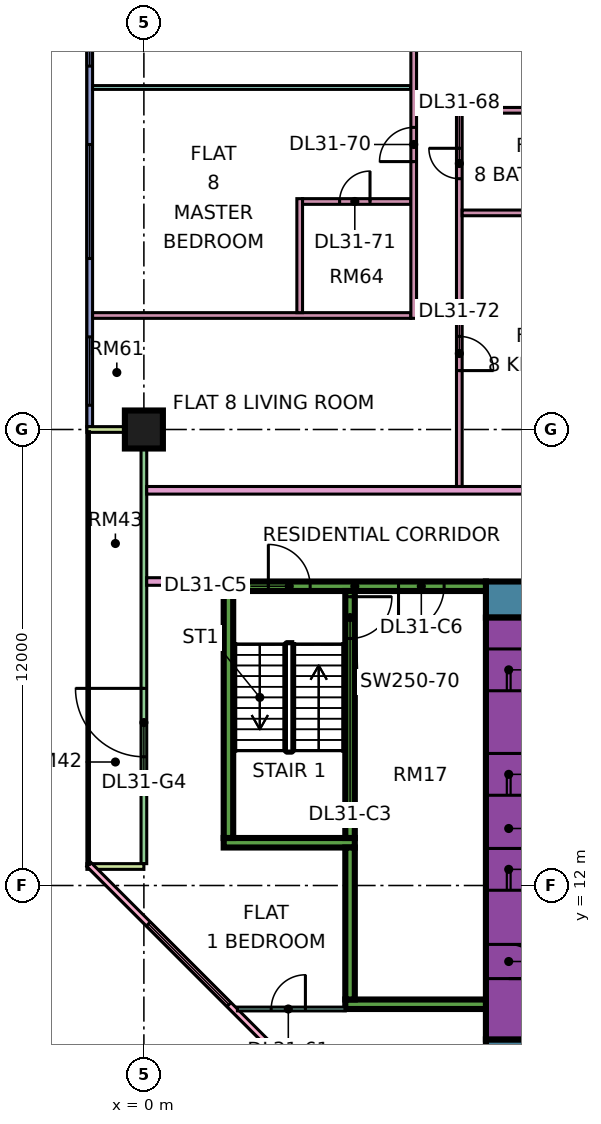
"""IFC4 building model, lengths in metres.
Left out: names, types, materials, properties, quantities, classifications, styles, units other than length and angle.
Written with IfcOpenShell. Run it as: python <this file> out.ifc"""

import sys

from ifc_helpers import new_model, si_unit, direction, frame, frame_2d, origin, origin_2d, place, context, subcontext, project, spatial, rectangle, extrude, element, fill, save


model = new_model("IFC4")
c1 = context("Model", 3, precision=1e-05, world=origin(), true_north=direction((0.0, 1.0)))
c2 = subcontext(c1, "Body", "Model", "MODEL_VIEW")
j1 = project(units=[si_unit("LENGTHUNIT", "METRE"), si_unit("PLANEANGLEUNIT", "RADIAN")], contexts=[c1])
p1 = place(None, origin())
s1 = spatial("IfcSite", under=j1, at=p1, CompositionType="ELEMENT")
p2 = place(p1, origin())
s2 = spatial("IfcBuilding", under=s1, at=p2, CompositionType="ELEMENT")
p3 = place(p2, frame((0.0, 0.0, 133.15)))
s3 = spatial("IfcBuildingStorey", under=s2, at=p3, CompositionType="ELEMENT", Elevation=133.15)
p4 = place(p3, frame((0.0, 24.0, 0.0), z_axis=(0.0, 0.0, 1.0), x_axis=(1.0, 0.0, 0.0)))
e1 = element("IfcColumn", 1, at=p4, inside=s3, PredefinedType="COLUMN", context=c2, shape_type="SweptSolid", body=[
    extrude(rectangle(XDim=1.0, YDim=1.0, at=origin_2d()), origin(), (0.0, 0.0, 1.0), 3.75),
])
p5 = place(p3, frame((9.0, 7.475, 0.0), z_axis=(0.0, 0.0, 1.0), x_axis=(1.0, 0.0, 0.0)))
e2 = element("IfcWall", 2, at=p5, inside=s3, PredefinedType="SHEAR", context=c2, shape_type="SweptSolid", body=[
    extrude(rectangle(XDim=25.0, YDim=0.95, at=frame_2d((12.5, 0.0))), origin(), (0.0, 0.0, 1.0), 3.75),
])
p6 = place(p3, frame((9.0, 19.525, 0.0), z_axis=(0.0, 0.0, 1.0), x_axis=(1.0, 0.0, 0.0)))
e3 = element("IfcWall", 3, at=p6, inside=s3, PredefinedType="SHEAR", context=c2, shape_type="SweptSolid", body=[
    extrude(rectangle(XDim=25.0, YDim=0.95, at=frame_2d((12.5, 0.0))), origin(), (0.0, 0.0, 1.0), 3.75),
])
p7 = place(p6, frame((19.1, 0.0, 0.0)))
e4 = element("IfcOpeningElement", 4, at=p7, cuts=e3, PredefinedType="OPENING", context=c2, shape_type="SweptSolid", body=[
    extrude(rectangle(XDim=1.8, YDim=2.4, at=frame_2d((0.9, 1.2))), frame((0.0, 0.485, 0.0), z_axis=(0.0, -1.0, 0.0), x_axis=(1.0, 0.0, 0.0)), (0.0, 0.0, 1.0), 0.97),
])
p8 = place(p3, frame((9.6, 7.95, 0.0), z_axis=(0.0, 0.0, 1.0), x_axis=(0.0, 1.0, 0.0)))
e5 = element("IfcWall", 5, at=p8, inside=s3, PredefinedType="SHEAR", context=c2, shape_type="SweptSolid", body=[
    extrude(rectangle(XDim=11.1, YDim=1.2, at=frame_2d((5.55, 0.0))), origin(), (0.0, 0.0, 1.0), 3.75),
])
p9 = place(p8, frame((3.925, 0.0, 0.0)))
e6 = element("IfcOpeningElement", 6, at=p9, cuts=e5, PredefinedType="OPENING", context=c2, shape_type="SweptSolid", body=[
    extrude(rectangle(XDim=1.1, YDim=2.2, at=frame_2d((0.55, 1.1))), frame((0.0, 0.61, 0.0), z_axis=(0.0, -1.0, 0.0), x_axis=(1.0, 0.0, 0.0)), (0.0, 0.0, 1.0), 1.22),
])
p10 = place(p8, frame((6.425, 0.0, 0.0)))
e7 = element("IfcOpeningElement", 7, at=p10, cuts=e5, PredefinedType="OPENING", context=c2, shape_type="SweptSolid", body=[
    extrude(rectangle(XDim=1.1, YDim=2.2, at=frame_2d((0.55, 1.1))), frame((0.0, 0.61, 0.0), z_axis=(0.0, -1.0, 0.0), x_axis=(1.0, 0.0, 0.0)), (0.0, 0.0, 1.0), 1.22),
])
p11 = place(p8, frame((9.175, 0.0, 0.0)))
e8 = element("IfcOpeningElement", 8, at=p11, cuts=e5, PredefinedType="OPENING", context=c2, shape_type="SweptSolid", body=[
    extrude(rectangle(XDim=1.1, YDim=2.2, at=frame_2d((0.55, 1.1))), frame((0.0, 0.61, 0.0), z_axis=(0.0, -1.0, 0.0), x_axis=(1.0, 0.0, 0.0)), (0.0, 0.0, 1.0), 1.22),
])
p12 = place(p8, frame((1.6, 0.0, 0.0)))
e9 = element("IfcOpeningElement", 9, at=p12, cuts=e5, PredefinedType="OPENING", context=c2, shape_type="SweptSolid", body=[
    extrude(rectangle(XDim=0.9, YDim=2.1, at=frame_2d((0.45, 1.05))), frame((0.0, 0.61, 0.0), z_axis=(0.0, -1.0, 0.0), x_axis=(1.0, 0.0, 0.0)), (0.0, 0.0, 1.0), 1.22),
])
p13 = place(p3, frame((2.1, 19.875, 0.0), z_axis=(0.0, 0.0, 1.0), x_axis=(1.0, 0.0, 0.0)))
e10 = element("IfcWall", 10, at=p13, inside=s3, PredefinedType="SHEAR", context=c2, shape_type="SweptSolid", body=[
    extrude(rectangle(XDim=6.9, YDim=0.25, at=frame_2d((3.45, 0.0))), origin(), (0.0, 0.0, 1.0), 3.75),
])
p14 = place(p13, frame((1.175, 0.0, 0.0)))
e11 = element("IfcOpeningElement", 11, at=p14, cuts=e10, PredefinedType="OPENING", context=c2, shape_type="SweptSolid", body=[
    extrude(rectangle(XDim=1.1, YDim=2.2, at=frame_2d((0.55, 1.1))), frame((0.0, 0.135, 0.0), z_axis=(0.0, -1.0, 0.0), x_axis=(1.0, 0.0, 0.0)), (0.0, 0.0, 1.0), 0.27),
])
p15 = place(p13, frame((4.6, 0.0, 0.0)))
e12 = element("IfcOpeningElement", 12, at=p15, cuts=e10, PredefinedType="OPENING", context=c2, shape_type="SweptSolid", body=[
    extrude(rectangle(XDim=1.2, YDim=2.2, at=frame_2d((0.6, 1.1))), frame((0.0, 0.135, 0.0), z_axis=(0.0, -1.0, 0.0), x_axis=(1.0, 0.0, 0.0)), (0.0, 0.0, 1.0), 0.27),
])
p16 = place(p3, frame((2.1, 13.125, 0.0), z_axis=(0.0, 0.0, 1.0), x_axis=(1.0, 0.0, 0.0)))
e13 = element("IfcWall", 13, at=p16, inside=s3, PredefinedType="SHEAR", context=c2, shape_type="SweptSolid", body=[
    extrude(rectangle(XDim=3.45, YDim=0.25, at=frame_2d((1.725, 0.0))), origin(), (0.0, 0.0, 1.0), 3.75),
])
p17 = place(p3, frame((2.225, 13.25, 0.0), z_axis=(0.0, 0.0, 1.0), x_axis=(0.0, 1.0, 0.0)))
e14 = element("IfcWall", 14, at=p17, inside=s3, PredefinedType="SHEAR", context=c2, shape_type="SweptSolid", body=[
    extrude(rectangle(XDim=6.5, YDim=0.25, at=frame_2d((3.25, 0.0))), origin(), (0.0, 0.0, 1.0), 3.75),
])
p18 = place(p3, frame((5.425, 13.25, 0.0), z_axis=(0.0, 0.0, 1.0), x_axis=(0.0, 1.0, 0.0)))
e15 = element("IfcWall", 15, at=p18, inside=s3, PredefinedType="SHEAR", context=c2, shape_type="SweptSolid", body=[
    extrude(rectangle(XDim=6.5, YDim=0.25, at=frame_2d((3.25, 0.0))), origin(), (0.0, 0.0, 1.0), 3.75),
])
p19 = place(p18, frame((5.25, 0.0, 0.0)))
e16 = element("IfcOpeningElement", 16, at=p19, cuts=e15, PredefinedType="OPENING", context=c2, shape_type="SweptSolid", body=[
    extrude(rectangle(XDim=1.1, YDim=2.2, at=frame_2d((0.55, 1.1))), frame((0.0, 0.135, 0.0), z_axis=(0.0, -1.0, 0.0), x_axis=(1.0, 0.0, 0.0)), (0.0, 0.0, 1.0), 0.27),
])
p20 = place(p3, frame((5.3, 8.875, 0.0), z_axis=(0.0, 0.0, 1.0), x_axis=(1.0, 0.0, 0.0)))
e17 = element("IfcWall", 17, at=p20, inside=s3, PredefinedType="SHEAR", context=c2, shape_type="SweptSolid", body=[
    extrude(rectangle(XDim=3.7, YDim=0.25, at=frame_2d((1.85, 0.0))), origin(), (0.0, 0.0, 1.0), 3.75),
])
p21 = place(p3, frame((5.425, 9.0, 0.0), z_axis=(0.0, 0.0, 1.0), x_axis=(0.0, 1.0, 0.0)))
e18 = element("IfcWall", 18, at=p21, inside=s3, PredefinedType="SHEAR", context=c2, shape_type="SweptSolid", body=[
    extrude(rectangle(XDim=4.0, YDim=0.25, at=frame_2d((2.0, 0.0))), origin(), (0.0, 0.0, 1.0), 3.75),
])
p22 = place(p3, frame((-1.425, 35.925, 0.0), z_axis=(0.0, 0.0, 1.0), x_axis=(0.0, -1.0, 0.0)))
e19 = element("IfcWall", 19, at=p22, inside=s3, PredefinedType="SOLIDWALL", context=c2, shape_type="SweptSolid", body=[
    extrude(rectangle(XDim=11.85, YDim=0.15, at=frame_2d((5.925, 0.0))), origin(), (0.0, 0.0, 1.0), 3.35),
])
p23 = place(p22, frame((0.562, 0.0, 0.45)))
e20 = element("IfcOpeningElement", 20, at=p23, cuts=e19, PredefinedType="OPENING", context=c2, shape_type="SweptSolid", body=[
    extrude(rectangle(XDim=1.8, YDim=2.4, at=frame_2d((0.9, 1.2))), frame((0.0, 0.085, 0.0), z_axis=(0.0, -1.0, 0.0), x_axis=(1.0, 0.0, 0.0)), (0.0, 0.0, 1.0), 0.17),
])
p24 = place(p22, frame((4.425, 0.0, 0.45)))
e21 = element("IfcOpeningElement", 21, at=p24, cuts=e19, PredefinedType="OPENING", context=c2, shape_type="SweptSolid", body=[
    extrude(rectangle(XDim=3.0, YDim=2.4, at=frame_2d((1.5, 1.2))), frame((0.0, 0.085, 0.0), z_axis=(0.0, -1.0, 0.0), x_axis=(1.0, 0.0, 0.0)), (0.0, 0.0, 1.0), 0.17),
])
p25 = place(p22, frame((9.488, 0.0, 0.45)))
e22 = element("IfcOpeningElement", 22, at=p25, cuts=e19, PredefinedType="OPENING", context=c2, shape_type="SweptSolid", body=[
    extrude(rectangle(XDim=1.8, YDim=2.4, at=frame_2d((0.9, 1.2))), frame((0.0, 0.085, 0.0), z_axis=(0.0, -1.0, 0.0), x_axis=(1.0, 0.0, 0.0)), (0.0, 0.0, 1.0), 0.17),
])
p26 = place(p3, frame((0.0, 23.925, 0.0), z_axis=(0.0, 0.0, 1.0), x_axis=(0.0, -1.0, 0.0)))
e23 = element("IfcWall", 23, at=p26, inside=s3, PredefinedType="SOLIDWALL", context=c2, shape_type="SweptSolid", body=[
    extrude(rectangle(XDim=11.35, YDim=0.15, at=frame_2d((5.675, 0.0))), origin(), (0.0, 0.0, 1.0), 3.35),
])
p27 = place(p26, frame((6.738, 0.0, 0.0)))
e24 = element("IfcOpeningElement", 24, at=p27, cuts=e23, PredefinedType="OPENING", context=c2, shape_type="SweptSolid", body=[
    extrude(rectangle(XDim=1.8, YDim=2.4, at=frame_2d((0.9, 1.2))), frame((0.0, 0.085, 0.0), z_axis=(0.0, -1.0, 0.0), x_axis=(1.0, 0.0, 0.0)), (0.0, 0.0, 1.0), 0.17),
])
for number, where, z_axis, x_axis in (
    (25, (-1.5, 24.0, 0.0), (0.0, 0.0, 1.0), (1.0, 0.0, 0.0)),
    (26, (-1.5, 12.5, 0.0), (0.0, 0.0, 1.0), (1.0, 0.0, 0.0)),
):
    element("IfcWall", number, at=place(p3, frame(where, z_axis=z_axis, x_axis=x_axis)), inside=s3, PredefinedType="SOLIDWALL", context=c2, shape_type="SweptSolid", body=[
        extrude(rectangle(XDim=1.5, YDim=0.15, at=frame_2d((0.75, 0.0))), origin(), (0.0, 0.0, 1.0), 3.35),
    ])
p28 = place(p3, frame((-1.447, 12.553, 0.0), z_axis=(0.0, 0.0, 1.0), x_axis=(0.707106781187, -0.707106781187, 0.0)))
e27 = element("IfcWall", 27, at=p28, inside=s3, PredefinedType="SOLIDWALL", context=c2, shape_type="SweptSolid", body=[
    extrude(rectangle(XDim=19.799, YDim=0.15, at=frame_2d((9.899, 0.0))), origin(), (0.0, 0.0, 1.0), 3.35),
])
p29 = place(p28, frame((2.212, 0.0, 0.45)))
e28 = element("IfcOpeningElement", 28, at=p29, cuts=e27, PredefinedType="OPENING", context=c2, shape_type="SweptSolid", body=[
    extrude(rectangle(XDim=3.0, YDim=2.4, at=frame_2d((1.5, 1.2))), frame((0.0, 0.085, 0.0), z_axis=(0.0, -1.0, 0.0), x_axis=(1.0, 0.0, 0.0)), (0.0, 0.0, 1.0), 0.17),
])
p30 = place(p28, frame((10.216, 0.0, 0.45)))
e29 = element("IfcOpeningElement", 29, at=p30, cuts=e27, PredefinedType="OPENING", context=c2, shape_type="SweptSolid", body=[
    extrude(rectangle(XDim=3.0, YDim=2.4, at=frame_2d((1.5, 1.2))), frame((0.0, 0.085, 0.0), z_axis=(0.0, -1.0, 0.0), x_axis=(1.0, 0.0, 0.0)), (0.0, 0.0, 1.0), 0.17),
])
p31 = place(p3, frame((-1.351, 33.0, 0.0), z_axis=(0.0, 0.0, 1.0), x_axis=(1.0, 0.0, 0.0)))
e30 = element("IfcWall", 30, at=p31, inside=s3, PredefinedType="PARTITIONING", context=c2, shape_type="SweptSolid", body=[
    extrude(rectangle(XDim=8.376, YDim=0.1, at=frame_2d((4.188, 0.0))), origin(), (0.0, 0.0, 1.0), 3.35),
])
p32 = place(p3, frame((-1.35, 27.0, 0.0), z_axis=(0.0, 0.0, 1.0), x_axis=(1.0, 0.0, 0.0)))
e31 = element("IfcWall", 31, at=p32, inside=s3, PredefinedType="PARTITIONING", context=c2, shape_type="SweptSolid", body=[
    extrude(rectangle(XDim=8.375, YDim=0.15, at=frame_2d((4.188, 0.0))), origin(), (0.0, 0.0, 1.0), 3.35),
])
p33 = place(p3, frame((0.074, 20.0, 0.0), z_axis=(0.0, 0.0, 1.0), x_axis=(1.0, 0.0, 0.0)))
e32 = element("IfcWall", 32, at=p33, inside=s3, PredefinedType="PARTITIONING", context=c2, shape_type="SweptSolid", body=[
    extrude(rectangle(XDim=2.026, YDim=0.2, at=frame_2d((1.013, 0.0))), origin(), (0.0, 0.0, 1.0), 3.35),
])
p34 = place(p3, frame((0.074, 22.4, 0.0), z_axis=(0.0, 0.0, 1.0), x_axis=(1.0, 0.0, 0.0)))
e33 = element("IfcWall", 33, at=p34, inside=s3, PredefinedType="PARTITIONING", context=c2, shape_type="SweptSolid", body=[
    extrude(rectangle(XDim=12.326, YDim=0.2, at=frame_2d((6.163, 0.0))), origin(), (0.0, 0.0, 1.0), 3.35),
])
p35 = place(p3, frame((2.461, 8.75, 0.0), z_axis=(0.0, 0.0, 1.0), x_axis=(1.0, 0.0, 0.0)))
e34 = element("IfcWall", 34, at=p35, inside=s3, PredefinedType="PARTITIONING", context=c2, shape_type="SweptSolid", body=[
    extrude(rectangle(XDim=2.839, YDim=0.1, at=frame_2d((1.419, 0.0))), origin(), (0.0, 0.0, 1.0), 3.35),
])
p36 = place(p35, frame((0.889, 0.0, 0.0)))
e35 = element("IfcOpeningElement", 35, at=p36, cuts=e34, PredefinedType="OPENING", context=c2, shape_type="SweptSolid", body=[
    extrude(rectangle(XDim=0.9, YDim=2.1, at=frame_2d((0.45, 1.05))), frame((0.0, 0.06, 0.0), z_axis=(0.0, -1.0, 0.0), x_axis=(1.0, 0.0, 0.0)), (0.0, 0.0, 1.0), 0.12),
])
p37 = place(p3, frame((4.1, 27.075, 0.0), z_axis=(0.0, 0.0, 1.0), x_axis=(0.0, 1.0, 0.0)))
e36 = element("IfcWall", 36, at=p37, inside=s3, PredefinedType="PARTITIONING", context=c2, shape_type="SweptSolid", body=[
    extrude(rectangle(XDim=3.0, YDim=0.15, at=frame_2d((1.5, 0.0))), origin(), (0.0, 0.0, 1.0), 3.35),
])
p38 = place(p3, frame((4.175, 30.0, 0.0), z_axis=(0.0, 0.0, 1.0), x_axis=(1.0, 0.0, 0.0)))
e37 = element("IfcWall", 37, at=p38, inside=s3, PredefinedType="PARTITIONING", context=c2, shape_type="SweptSolid", body=[
    extrude(rectangle(XDim=2.85, YDim=0.15, at=frame_2d((1.425, 0.0))), origin(), (0.0, 0.0, 1.0), 3.35),
])
p39 = place(p38, frame((0.975, 0.0, 0.0)))
e38 = element("IfcOpeningElement", 38, at=p39, cuts=e37, PredefinedType="OPENING", context=c2, shape_type="SweptSolid", body=[
    extrude(rectangle(XDim=0.8, YDim=2.1, at=frame_2d((0.4, 1.05))), frame((0.0, 0.085, 0.0), z_axis=(0.0, -1.0, 0.0), x_axis=(1.0, 0.0, 0.0)), (0.0, 0.0, 1.0), 0.17),
])
p40 = place(p3, frame((7.1, 26.925, 0.0), z_axis=(0.0, 0.0, 1.0), x_axis=(0.0, 1.0, 0.0)))
e39 = element("IfcWall", 39, at=p40, inside=s3, PredefinedType="PARTITIONING", context=c2, shape_type="SweptSolid", body=[
    extrude(rectangle(XDim=8.975, YDim=0.15, at=frame_2d((4.487, 0.0))), origin(), (0.0, 0.0, 1.0), 3.35),
])
p41 = place(p40, frame((7.125, 0.0, 0.0)))
e40 = element("IfcOpeningElement", 40, at=p41, cuts=e39, PredefinedType="OPENING", context=c2, shape_type="SweptSolid", body=[
    extrude(rectangle(XDim=0.9, YDim=2.1, at=frame_2d((0.45, 1.05))), frame((0.0, 0.085, 0.0), z_axis=(0.0, -1.0, 0.0), x_axis=(1.0, 0.0, 0.0)), (0.0, 0.0, 1.0), 0.17),
])
p42 = place(p40, frame((4.125, 0.0, 0.0)))
e41 = element("IfcOpeningElement", 41, at=p42, cuts=e39, PredefinedType="OPENING", context=c2, shape_type="SweptSolid", body=[
    extrude(rectangle(XDim=0.9, YDim=2.1, at=frame_2d((0.45, 1.05))), frame((0.0, 0.085, 0.0), z_axis=(0.0, -1.0, 0.0), x_axis=(1.0, 0.0, 0.0)), (0.0, 0.0, 1.0), 0.17),
])
p43 = place(p3, frame((8.3, 22.5, 0.0), z_axis=(0.0, 0.0, 1.0), x_axis=(0.0, 1.0, 0.0)))
e42 = element("IfcWall", 42, at=p43, inside=s3, PredefinedType="PARTITIONING", context=c2, shape_type="SweptSolid", body=[
    extrude(rectangle(XDim=9.975, YDim=0.15, at=frame_2d((4.988, 0.0))), origin(), (0.0, 0.0, 1.0), 3.35),
])
p44 = place(p43, frame((8.1, 0.0, 0.0)))
e43 = element("IfcOpeningElement", 43, at=p44, cuts=e42, PredefinedType="OPENING", context=c2, shape_type="SweptSolid", body=[
    extrude(rectangle(XDim=0.8, YDim=2.1, at=frame_2d((0.4, 1.05))), frame((0.0, 0.085, 0.0), z_axis=(0.0, -1.0, 0.0), x_axis=(1.0, 0.0, 0.0)), (0.0, 0.0, 1.0), 0.17),
])
p45 = place(p43, frame((3.05, 0.0, 0.0)))
e44 = element("IfcOpeningElement", 44, at=p45, cuts=e42, PredefinedType="OPENING", context=c2, shape_type="SweptSolid", body=[
    extrude(rectangle(XDim=0.9, YDim=2.1, at=frame_2d((0.45, 1.05))), frame((0.0, 0.085, 0.0), z_axis=(0.0, -1.0, 0.0), x_axis=(1.0, 0.0, 0.0)), (0.0, 0.0, 1.0), 0.17),
])
for number, where, z_axis, x_axis in (
    (45, (8.375, 29.7, 0.0), (0.0, 0.0, 1.0), (1.0, 0.0, 0.0)),
    (46, (8.375, 32.4, 0.0), (0.0, 0.0, 1.0), (1.0, 0.0, 0.0)),
):
    element("IfcWall", number, at=place(p3, frame(where, z_axis=z_axis, x_axis=x_axis)), inside=s3, PredefinedType="PARTITIONING", context=c2, shape_type="SweptSolid", body=[
        extrude(rectangle(XDim=4.025, YDim=0.15, at=frame_2d((2.012, 0.0))), origin(), (0.0, 0.0, 1.0), 3.35),
    ])
p46 = place(p23, origin())
e47 = element("IfcWindow", 47, at=p46, inside=s3, PartitioningType="SINGLE_PANEL", PredefinedType="WINDOW", context=c2, shape_type="SweptSolid", body=[
    extrude(rectangle(XDim=1.8, YDim=2.4, at=frame_2d((0.9, 1.2))), frame((0.0, 0.03, 0.0), z_axis=(0.0, -1.0, 0.0), x_axis=(1.0, 0.0, 0.0)), (0.0, 0.0, 1.0), 0.06),
])
fill(e20, e47)
p47 = place(p24, origin())
e48 = element("IfcWindow", 48, at=p47, inside=s3, PartitioningType="SINGLE_PANEL", PredefinedType="WINDOW", context=c2, shape_type="SweptSolid", body=[
    extrude(rectangle(XDim=3.0, YDim=2.4, at=frame_2d((1.5, 1.2))), frame((0.0, 0.03, 0.0), z_axis=(0.0, -1.0, 0.0), x_axis=(1.0, 0.0, 0.0)), (0.0, 0.0, 1.0), 0.06),
])
fill(e21, e48)
p48 = place(p25, origin())
e49 = element("IfcWindow", 49, at=p48, inside=s3, PartitioningType="SINGLE_PANEL", PredefinedType="WINDOW", context=c2, shape_type="SweptSolid", body=[
    extrude(rectangle(XDim=1.8, YDim=2.4, at=frame_2d((0.9, 1.2))), frame((0.0, 0.03, 0.0), z_axis=(0.0, -1.0, 0.0), x_axis=(1.0, 0.0, 0.0)), (0.0, 0.0, 1.0), 0.06),
])
fill(e22, e49)
p49 = place(p27, frame((1.8, 0.0, 0.0), z_axis=(0.0, 0.0, 1.0), x_axis=(-1.0, 0.0, 0.0)))
e50 = element("IfcDoor", 50, at=p49, inside=s3, OperationType="DOUBLE_DOOR_SINGLE_SWING", PredefinedType="DOOR", context=c2, shape_type="SweptSolid", body=[
    extrude(rectangle(XDim=1.8, YDim=2.4, at=frame_2d((0.9, 1.2))), frame((0.0, 0.025, 0.0), z_axis=(0.0, -1.0, 0.0), x_axis=(1.0, 0.0, 0.0)), (0.0, 0.0, 1.0), 0.05),
])
fill(e24, e50)
p50 = place(p29, origin())
e51 = element("IfcWindow", 51, at=p50, inside=s3, PartitioningType="SINGLE_PANEL", PredefinedType="WINDOW", context=c2, shape_type="SweptSolid", body=[
    extrude(rectangle(XDim=3.0, YDim=2.4, at=frame_2d((1.5, 1.2))), frame((0.0, 0.03, 0.0), z_axis=(0.0, -1.0, 0.0), x_axis=(1.0, 0.0, 0.0)), (0.0, 0.0, 1.0), 0.06),
])
fill(e28, e51)
p51 = place(p9, origin())
e52 = element("IfcDoor", 52, at=p51, inside=s3, OperationType="DOUBLE_DOOR_SLIDING", PredefinedType="DOOR", context=c2, shape_type="SweptSolid", body=[
    extrude(rectangle(XDim=1.1, YDim=2.2, at=frame_2d((0.55, 1.1))), frame((0.0, 0.025, 0.0), z_axis=(0.0, -1.0, 0.0), x_axis=(1.0, 0.0, 0.0)), (0.0, 0.0, 1.0), 0.05),
])
fill(e6, e52)
p52 = place(p10, origin())
e53 = element("IfcDoor", 53, at=p52, inside=s3, OperationType="DOUBLE_DOOR_SLIDING", PredefinedType="DOOR", context=c2, shape_type="SweptSolid", body=[
    extrude(rectangle(XDim=1.1, YDim=2.2, at=frame_2d((0.55, 1.1))), frame((0.0, 0.025, 0.0), z_axis=(0.0, -1.0, 0.0), x_axis=(1.0, 0.0, 0.0)), (0.0, 0.0, 1.0), 0.05),
])
fill(e7, e53)
p53 = place(p11, origin())
e54 = element("IfcDoor", 54, at=p53, inside=s3, OperationType="DOUBLE_DOOR_SLIDING", PredefinedType="DOOR", context=c2, shape_type="SweptSolid", body=[
    extrude(rectangle(XDim=1.1, YDim=2.2, at=frame_2d((0.55, 1.1))), frame((0.0, 0.025, 0.0), z_axis=(0.0, -1.0, 0.0), x_axis=(1.0, 0.0, 0.0)), (0.0, 0.0, 1.0), 0.05),
])
fill(e8, e54)
p54 = place(p19, origin())
e55 = element("IfcDoor", 55, at=p54, inside=s3, OperationType="SINGLE_SWING_RIGHT", PredefinedType="DOOR", context=c2, shape_type="SweptSolid", body=[
    extrude(rectangle(XDim=1.1, YDim=2.2, at=frame_2d((0.55, 1.1))), frame((0.0, 0.025, 0.0), z_axis=(0.0, -1.0, 0.0), x_axis=(1.0, 0.0, 0.0)), (0.0, 0.0, 1.0), 0.05),
])
fill(e16, e55)
p55 = place(p12, frame((0.9, 0.0, 0.0), z_axis=(0.0, 0.0, 1.0), x_axis=(-1.0, 0.0, 0.0)))
e56 = element("IfcDoor", 56, at=p55, inside=s3, OperationType="SINGLE_SWING_LEFT", PredefinedType="DOOR", context=c2, shape_type="SweptSolid", body=[
    extrude(rectangle(XDim=0.9, YDim=2.1, at=frame_2d((0.45, 1.05))), frame((0.0, 0.025, 0.0), z_axis=(0.0, -1.0, 0.0), x_axis=(1.0, 0.0, 0.0)), (0.0, 0.0, 1.0), 0.05),
])
fill(e9, e56)
p56 = place(p14, origin())
e57 = element("IfcDoor", 57, at=p56, inside=s3, OperationType="SINGLE_SWING_LEFT", PredefinedType="DOOR", context=c2, shape_type="SweptSolid", body=[
    extrude(rectangle(XDim=1.1, YDim=2.2, at=frame_2d((0.55, 1.1))), frame((0.0, 0.025, 0.0), z_axis=(0.0, -1.0, 0.0), x_axis=(1.0, 0.0, 0.0)), (0.0, 0.0, 1.0), 0.05),
])
fill(e11, e57)
p57 = place(p15, frame((1.2, 0.0, 0.0), z_axis=(0.0, 0.0, 1.0), x_axis=(-1.0, 0.0, 0.0)))
e58 = element("IfcDoor", 58, at=p57, inside=s3, OperationType="SINGLE_SWING_LEFT", PredefinedType="DOOR", context=c2, shape_type="SweptSolid", body=[
    extrude(rectangle(XDim=1.2, YDim=2.2, at=frame_2d((0.6, 1.1))), frame((0.0, 0.025, 0.0), z_axis=(0.0, -1.0, 0.0), x_axis=(1.0, 0.0, 0.0)), (0.0, 0.0, 1.0), 0.05),
])
fill(e12, e58)
p58 = place(p36, frame((0.9, 0.0, 0.0), z_axis=(0.0, 0.0, 1.0), x_axis=(-1.0, 0.0, 0.0)))
e59 = element("IfcDoor", 59, at=p58, inside=s3, OperationType="SINGLE_SWING_RIGHT", PredefinedType="DOOR", context=c2, shape_type="SweptSolid", body=[
    extrude(rectangle(XDim=0.9, YDim=2.1, at=frame_2d((0.45, 1.05))), frame((0.0, 0.025, 0.0), z_axis=(0.0, -1.0, 0.0), x_axis=(1.0, 0.0, 0.0)), (0.0, 0.0, 1.0), 0.05),
])
fill(e35, e59)
p59 = place(p44, frame((0.8, 0.0, 0.0), z_axis=(0.0, 0.0, 1.0), x_axis=(-1.0, 0.0, 0.0)))
e60 = element("IfcDoor", 60, at=p59, inside=s3, OperationType="SINGLE_SWING_RIGHT", PredefinedType="DOOR", context=c2, shape_type="SweptSolid", body=[
    extrude(rectangle(XDim=0.8, YDim=2.1, at=frame_2d((0.4, 1.05))), frame((0.0, 0.025, 0.0), z_axis=(0.0, -1.0, 0.0), x_axis=(1.0, 0.0, 0.0)), (0.0, 0.0, 1.0), 0.05),
])
fill(e43, e60)
p60 = place(p42, origin())
e61 = element("IfcDoor", 61, at=p60, inside=s3, OperationType="SINGLE_SWING_LEFT", PredefinedType="DOOR", context=c2, shape_type="SweptSolid", body=[
    extrude(rectangle(XDim=0.9, YDim=2.1, at=frame_2d((0.45, 1.05))), frame((0.0, 0.025, 0.0), z_axis=(0.0, -1.0, 0.0), x_axis=(1.0, 0.0, 0.0)), (0.0, 0.0, 1.0), 0.05),
])
fill(e41, e61)
p61 = place(p39, frame((0.8, 0.0, 0.0), z_axis=(0.0, 0.0, 1.0), x_axis=(-1.0, 0.0, 0.0)))
e62 = element("IfcDoor", 62, at=p61, inside=s3, OperationType="SINGLE_SWING_RIGHT", PredefinedType="DOOR", context=c2, shape_type="SweptSolid", body=[
    extrude(rectangle(XDim=0.8, YDim=2.1, at=frame_2d((0.4, 1.05))), frame((0.0, 0.025, 0.0), z_axis=(0.0, -1.0, 0.0), x_axis=(1.0, 0.0, 0.0)), (0.0, 0.0, 1.0), 0.05),
])
fill(e38, e62)
p62 = place(p45, frame((0.9, 0.0, 0.0), z_axis=(0.0, 0.0, 1.0), x_axis=(-1.0, 0.0, 0.0)))
e63 = element("IfcDoor", 63, at=p62, inside=s3, OperationType="SINGLE_SWING_LEFT", PredefinedType="DOOR", context=c2, shape_type="SweptSolid", body=[
    extrude(rectangle(XDim=0.9, YDim=2.1, at=frame_2d((0.45, 1.05))), frame((0.0, 0.025, 0.0), z_axis=(0.0, -1.0, 0.0), x_axis=(1.0, 0.0, 0.0)), (0.0, 0.0, 1.0), 0.05),
])
fill(e44, e63)
save(model, sys.argv[1])
